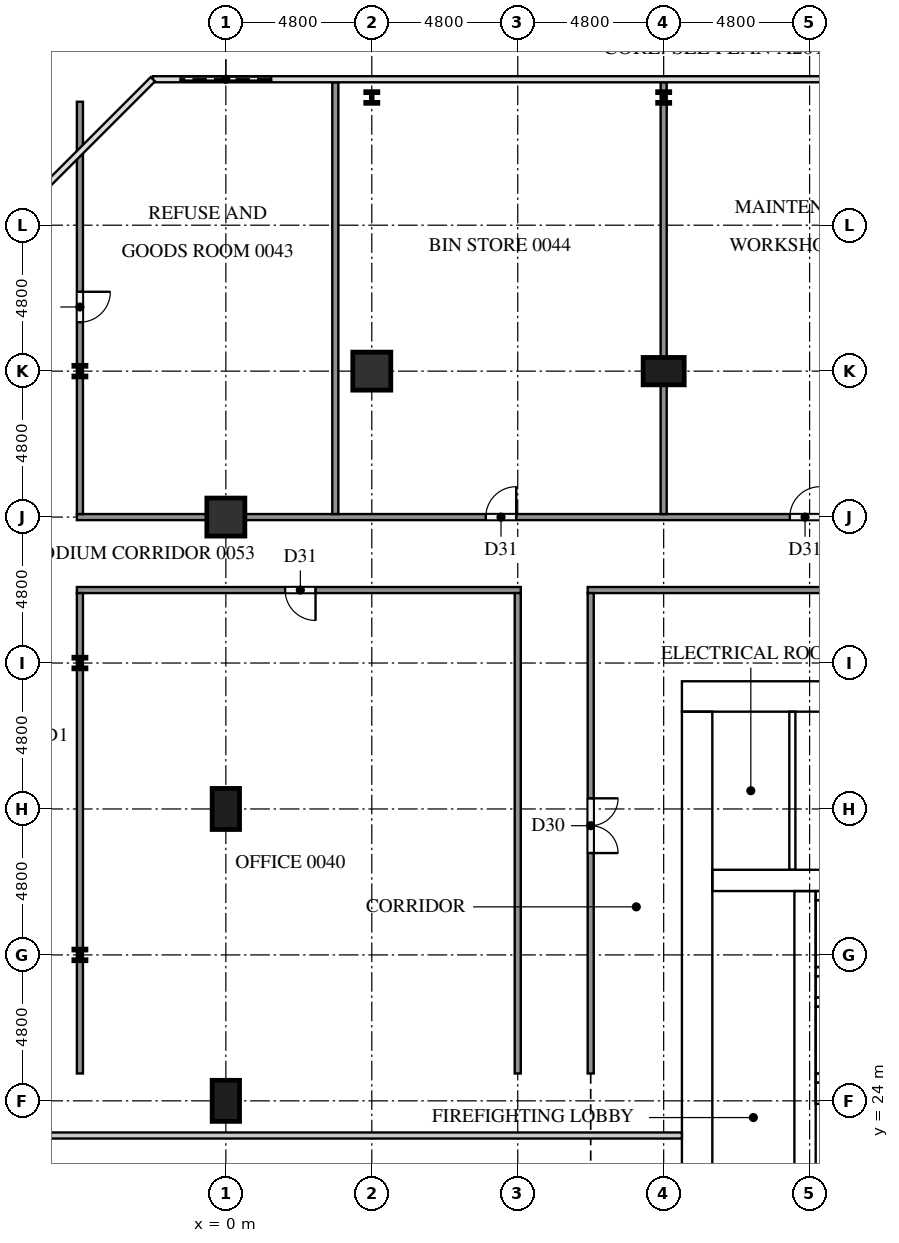
"""IFC4 building model, lengths in metres.
Left out: names, types, materials, properties, quantities, classifications, styles, units other than length and angle.
Written with IfcOpenShell. Run it as: python <this file> out.ifc"""

import sys

from ifc_helpers import new_model, si_unit, direction, frame, frame_2d, origin, origin_2d, place, context, subcontext, project, spatial, rectangle, i_section, extrude, element, fill, save


model = new_model("IFC4")
c1 = context("Model", 3, precision=1e-05, world=origin(), true_north=direction((0.0, 1.0)))
c2 = subcontext(c1, "Body", "Model", "MODEL_VIEW")
j1 = project(units=[si_unit("LENGTHUNIT", "METRE"), si_unit("PLANEANGLEUNIT", "RADIAN")], contexts=[c1])
p1 = place(None, origin())
s1 = spatial("IfcSite", under=j1, at=p1, CompositionType="ELEMENT")
p2 = place(p1, origin())
s2 = spatial("IfcBuilding", under=s1, at=p2, CompositionType="ELEMENT")
p3 = place(p2, origin())
s3 = spatial("IfcBuildingStorey", under=s2, at=p3, CompositionType="ELEMENT", Elevation=0.0)
p4 = place(p3, frame((15.0, 37.3, 0.0), z_axis=(0.0, 0.0, 1.0), x_axis=(1.0, 0.0, 0.0)))
e1 = element("IfcWall", 1, at=p4, inside=s3, PredefinedType="SHEAR", context=c2, shape_type="SweptSolid", body=[
    extrude(rectangle(XDim=32.4, YDim=1.0, at=frame_2d((16.2, 0.0))), origin(), (0.0, 0.0, 1.0), 5.7),
])
p5 = place(p4, frame((15.3, 0.0, 0.0)))
e2 = element("IfcOpeningElement", 2, at=p5, cuts=e1, PredefinedType="OPENING", context=c2, shape_type="SweptSolid", body=[
    extrude(rectangle(XDim=1.8, YDim=2.1, at=frame_2d((0.9, 1.05))), frame((0.0, 0.51, 0.0), z_axis=(0.0, -1.0, 0.0), x_axis=(1.0, 0.0, 0.0)), (0.0, 0.0, 1.0), 1.02),
])
p6 = place(p4, frame((1.766, 0.0, 0.0)))
e3 = element("IfcOpeningElement", 3, at=p6, cuts=e1, PredefinedType="OPENING", context=c2, shape_type="SweptSolid", body=[
    extrude(rectangle(XDim=1.0, YDim=2.1, at=frame_2d((0.5, 1.05))), frame((0.0, 0.51, 0.0), z_axis=(0.0, -1.0, 0.0), x_axis=(1.0, 0.0, 0.0)), (0.0, 0.0, 1.0), 1.02),
])
p7 = place(p4, frame((5.241, 0.0, 0.0)))
e4 = element("IfcOpeningElement", 4, at=p7, cuts=e1, PredefinedType="OPENING", context=c2, shape_type="SweptSolid", body=[
    extrude(rectangle(XDim=1.0, YDim=2.1, at=frame_2d((0.5, 1.05))), frame((0.0, 0.51, 0.0), z_axis=(0.0, -1.0, 0.0), x_axis=(1.0, 0.0, 0.0)), (0.0, 0.0, 1.0), 1.02),
])
p8 = place(p3, frame((15.5, 16.0, 0.0), z_axis=(0.0, 0.0, 1.0), x_axis=(0.0, 1.0, 0.0)))
e5 = element("IfcWall", 5, at=p8, inside=s3, PredefinedType="SHEAR", context=c2, shape_type="SweptSolid", body=[
    extrude(rectangle(XDim=20.8, YDim=1.0, at=frame_2d((10.4, 0.0))), origin(), (0.0, 0.0, 1.0), 5.7),
])
p9 = place(p8, frame((4.76, 0.0, 0.0)))
e6 = element("IfcOpeningElement", 6, at=p9, cuts=e5, PredefinedType="OPENING", context=c2, shape_type="SweptSolid", body=[
    extrude(rectangle(XDim=1.2, YDim=2.1, at=frame_2d((0.6, 1.05))), frame((0.0, 0.51, 0.0), z_axis=(0.0, -1.0, 0.0), x_axis=(1.0, 0.0, 0.0)), (0.0, 0.0, 1.0), 1.02),
])
p10 = place(p3, frame((19.05, 16.0, 0.0), z_axis=(0.0, 0.0, 1.0), x_axis=(0.0, 1.0, 0.0)))
e7 = element("IfcWall", 7, at=p10, inside=s3, PredefinedType="SHEAR", context=c2, shape_type="SweptSolid", body=[
    extrude(rectangle(XDim=14.9, YDim=0.7, at=frame_2d((7.45, 0.0))), origin(), (0.0, 0.0, 1.0), 5.7),
])
p11 = place(p10, frame((9.45, 0.0, 0.0)))
e8 = element("IfcOpeningElement", 8, at=p11, cuts=e7, PredefinedType="OPENING", context=c2, shape_type="SweptSolid", body=[
    extrude(rectangle(XDim=1.1, YDim=2.1, at=frame_2d((0.55, 1.05))), frame((0.0, 0.36, 0.0), z_axis=(0.0, -1.0, 0.0), x_axis=(1.0, 0.0, 0.0)), (0.0, 0.0, 1.0), 0.72),
])
p12 = place(p10, frame((12.95, 0.0, 0.0)))
e9 = element("IfcOpeningElement", 9, at=p12, cuts=e7, PredefinedType="OPENING", context=c2, shape_type="SweptSolid", body=[
    extrude(rectangle(XDim=1.1, YDim=2.1, at=frame_2d((0.55, 1.05))), frame((0.0, 0.36, 0.0), z_axis=(0.0, -1.0, 0.0), x_axis=(1.0, 0.0, 0.0)), (0.0, 0.0, 1.0), 0.72),
])
p13 = place(p10, frame((0.2, 0.0, 0.0)))
e10 = element("IfcOpeningElement", 10, at=p13, cuts=e7, PredefinedType="OPENING", context=c2, shape_type="SweptSolid", body=[
    extrude(rectangle(XDim=1.2, YDim=2.1, at=frame_2d((0.6, 1.05))), frame((0.0, 0.36, 0.0), z_axis=(0.0, -1.0, 0.0), x_axis=(1.0, 0.0, 0.0)), (0.0, 0.0, 1.0), 0.72),
])
for number, where, z_axis, x_axis in (
    (11, (19.4, 24.25, 0.0), (0.0, 0.0, 1.0), (1.0, 0.0, 0.0)),
    (12, (19.4, 27.75, 0.0), (0.0, 0.0, 1.0), (1.0, 0.0, 0.0)),
):
    element("IfcWall", number, at=place(p3, frame(where, z_axis=z_axis, x_axis=x_axis)), inside=s3, PredefinedType="SHEAR", context=c2, shape_type="SweptSolid", body=[
        extrude(rectangle(XDim=3.35, YDim=0.7, at=frame_2d((1.675, 0.0))), origin(), (0.0, 0.0, 1.0), 5.7),
    ])
p14 = place(p3, frame((16.0, 31.25, 0.0), z_axis=(0.0, 0.0, 1.0), x_axis=(1.0, 0.0, 0.0)))
e13 = element("IfcWall", 13, at=p14, inside=s3, PredefinedType="SHEAR", context=c2, shape_type="SweptSolid", body=[
    extrude(rectangle(XDim=6.75, YDim=0.7, at=frame_2d((3.375, 0.0))), origin(), (0.0, 0.0, 1.0), 5.7),
])
for number, where, z_axis, x_axis in (
    (14, (19.4, 24.75, -1.8), (0.0, 0.0, 1.0), (1.0, 0.0, 0.0)),
    (15, (19.4, 27.25, -1.8), (0.0, 0.0, 1.0), (1.0, 0.0, 0.0)),
):
    element("IfcWall", number, at=place(p3, frame(where, z_axis=z_axis, x_axis=x_axis)), inside=s3, PredefinedType="SOLIDWALL", context=c2, shape_type="SweptSolid", body=[
        extrude(rectangle(XDim=3.35, YDim=0.3, at=frame_2d((1.675, 0.0))), origin(), (0.0, 0.0, 1.0), 1.8),
    ])
p15 = place(p3, frame((19.55, 24.9, -1.8), z_axis=(0.0, 0.0, 1.0), x_axis=(0.0, 1.0, 0.0)))
e16 = element("IfcWall", 16, at=p15, inside=s3, PredefinedType="SOLIDWALL", context=c2, shape_type="SweptSolid", body=[
    extrude(rectangle(XDim=2.2, YDim=0.3, at=frame_2d((1.1, 0.0))), origin(), (0.0, 0.0, 1.0), 1.8),
])
for number, where, z_axis, x_axis in (
    (17, (19.4, 28.25, -1.8), (0.0, 0.0, 1.0), (1.0, 0.0, 0.0)),
    (18, (19.4, 30.75, -1.8), (0.0, 0.0, 1.0), (1.0, 0.0, 0.0)),
):
    element("IfcWall", number, at=place(p3, frame(where, z_axis=z_axis, x_axis=x_axis)), inside=s3, PredefinedType="SOLIDWALL", context=c2, shape_type="SweptSolid", body=[
        extrude(rectangle(XDim=3.35, YDim=0.3, at=frame_2d((1.675, 0.0))), origin(), (0.0, 0.0, 1.0), 1.8),
    ])
p16 = place(p3, frame((19.55, 28.4, -1.8), z_axis=(0.0, 0.0, 1.0), x_axis=(0.0, 1.0, 0.0)))
e19 = element("IfcWall", 19, at=p16, inside=s3, PredefinedType="SOLIDWALL", context=c2, shape_type="SweptSolid", body=[
    extrude(rectangle(XDim=2.2, YDim=0.3, at=frame_2d((1.1, 0.0))), origin(), (0.0, 0.0, 1.0), 1.8),
])
p17 = place(p3, frame((14.4, 48.0, 0.0), z_axis=(0.0, 0.0, 1.0), x_axis=(1.0, 0.0, 0.0)))
e20 = element("IfcColumn", 20, at=p17, inside=s3, PredefinedType="COLUMN", context=c2, shape_type="SweptSolid", body=[
    extrude(rectangle(XDim=1.35, YDim=0.9, at=origin_2d()), origin(), (0.0, 0.0, 1.0), 5.7),
])
for number, where, z_axis, x_axis in (
    (21, (4.8, 48.0, 0.0), (0.0, 0.0, 1.0), (1.0, 0.0, 0.0)),
    (22, (0.0, 43.2, 0.0), (0.0, 0.0, 1.0), (1.0, 0.0, 0.0)),
):
    element("IfcColumn", number, at=place(p3, frame(where, z_axis=z_axis, x_axis=x_axis)), inside=s3, PredefinedType="COLUMN", context=c2, shape_type="SweptSolid", body=[
        extrude(rectangle(XDim=1.25, YDim=1.25, at=origin_2d()), origin(), (0.0, 0.0, 1.0), 5.7),
    ])
for number, where, z_axis, x_axis in (
    (23, (0.0, 33.6, 0.0), (0.0, 0.0, 1.0), (0.0, 1.0, 0.0)),
    (24, (0.0, 24.0, 0.0), (0.0, 0.0, 1.0), (0.0, 1.0, 0.0)),
):
    element("IfcColumn", number, at=place(p3, frame(where, z_axis=z_axis, x_axis=x_axis)), inside=s3, PredefinedType="COLUMN", context=c2, shape_type="SweptSolid", body=[
        extrude(rectangle(XDim=1.35, YDim=0.9, at=origin_2d()), origin(), (0.0, 0.0, 1.0), 5.7),
    ])
for number, where, z_axis, x_axis in (
    (25, (-4.8, 28.8, 0.0), (0.0, 0.0, 1.0), (1.0, 0.0, 0.0)),
    (26, (-4.8, 38.4, 0.0), (0.0, 0.0, 1.0), (1.0, 0.0, 0.0)),
    (27, (-4.8, 48.0, 0.0), (0.0, 0.0, 1.0), (1.0, 0.0, 0.0)),
    (28, (4.8, 57.0, 0.0), (0.0, 0.0, 1.0), (1.0, 0.0, 0.0)),
    (29, (14.4, 57.0, 0.0), (0.0, 0.0, 1.0), (1.0, 0.0, 0.0)),
):
    element("IfcColumn", number, at=place(p3, frame(where, z_axis=z_axis, x_axis=x_axis)), inside=s3, PredefinedType="COLUMN", context=c2, shape_type="SweptSolid", body=[
        extrude(i_section(OverallWidth=0.396, OverallDepth=0.381, WebThickness=0.019, FlangeThickness=0.03, at=origin_2d()), origin(), (0.0, 0.0, 1.0), 5.7),
    ])
p18 = place(p3, frame((2.4, 57.6, 0.0), z_axis=(0.0, 0.0, 1.0), x_axis=(-1.0, 0.0, 0.0)))
e30 = element("IfcWall", 30, at=p18, inside=s3, PredefinedType="SOLIDWALL", context=c2, shape_type="SweptSolid", body=[
    extrude(rectangle(XDim=4.8, YDim=0.15, at=frame_2d((2.4, 0.0))), origin(), (0.0, 0.0, 1.0), 5.7),
])
p19 = place(p18, frame((0.9, 0.0, 0.0)))
e31 = element("IfcOpeningElement", 31, at=p19, cuts=e30, PredefinedType="OPENING", context=c2, shape_type="SweptSolid", body=[
    extrude(rectangle(XDim=3.0, YDim=3.6, at=frame_2d((1.5, 1.8))), frame((0.0, 0.085, 0.0), z_axis=(0.0, -1.0, 0.0), x_axis=(1.0, 0.0, 0.0)), (0.0, 0.0, 1.0), 0.17),
])
p20 = place(p3, frame((18.633, 31.6, 0.0), z_axis=(0.0, 0.0, 1.0), x_axis=(0.0, 1.0, 0.0)))
e32 = element("IfcWall", 32, at=p20, inside=s3, PredefinedType="PARTITIONING", context=c2, shape_type="SweptSolid", body=[
    extrude(rectangle(XDim=5.2, YDim=0.2, at=frame_2d((2.6, 0.0))), origin(), (0.0, 0.0, 1.0), 5.7),
])
p21 = place(p3, frame((-6.9, 22.86, 0.0), z_axis=(0.0, 0.0, 1.0), x_axis=(1.0, 0.0, 0.0)))
e33 = element("IfcWall", 33, at=p21, inside=s3, PredefinedType="PARTITIONING", context=c2, shape_type="SweptSolid", body=[
    extrude(rectangle(XDim=21.9, YDim=0.2, at=frame_2d((10.95, 0.0))), origin(), (0.0, 0.0, 1.0), 5.7),
])
p22 = place(p3, frame((9.7, 40.8, 0.0), z_axis=(0.0, 0.0, 1.0), x_axis=(-1.0, 0.0, 0.0)))
e34 = element("IfcWall", 34, at=p22, inside=s3, PredefinedType="PARTITIONING", context=c2, shape_type="SweptSolid", body=[
    extrude(rectangle(XDim=14.6, YDim=0.2, at=frame_2d((7.3, 0.0))), origin(), (0.0, 0.0, 1.0), 5.7),
])
p23 = place(p22, frame((6.75, 0.0, 0.0)))
e35 = element("IfcOpeningElement", 35, at=p23, cuts=e34, PredefinedType="OPENING", context=c2, shape_type="SweptSolid", body=[
    extrude(rectangle(XDim=1.0, YDim=2.1, at=frame_2d((0.5, 1.05))), frame((0.0, 0.11, 0.0), z_axis=(0.0, -1.0, 0.0), x_axis=(1.0, 0.0, 0.0)), (0.0, 0.0, 1.0), 0.22),
])
p24 = place(p3, frame((50.5, 40.8, 0.0), z_axis=(0.0, 0.0, 1.0), x_axis=(-1.0, 0.0, 0.0)))
e36 = element("IfcWall", 36, at=p24, inside=s3, PredefinedType="PARTITIONING", context=c2, shape_type="SweptSolid", body=[
    extrude(rectangle(XDim=38.6, YDim=0.2, at=frame_2d((19.3, 0.0))), origin(), (0.0, 0.0, 1.0), 5.7),
])
p25 = place(p24, frame((19.35, 0.0, 0.0)))
e37 = element("IfcOpeningElement", 37, at=p25, cuts=e36, PredefinedType="OPENING", context=c2, shape_type="SweptSolid", body=[
    extrude(rectangle(XDim=1.8, YDim=2.1, at=frame_2d((0.9, 1.05))), frame((0.0, 0.11, 0.0), z_axis=(0.0, -1.0, 0.0), x_axis=(1.0, 0.0, 0.0)), (0.0, 0.0, 1.0), 0.22),
])
p26 = place(p24, frame((17.05, 0.0, 0.0)))
e38 = element("IfcOpeningElement", 38, at=p26, cuts=e36, PredefinedType="OPENING", context=c2, shape_type="SweptSolid", body=[
    extrude(rectangle(XDim=1.8, YDim=2.1, at=frame_2d((0.9, 1.05))), frame((0.0, 0.11, 0.0), z_axis=(0.0, -1.0, 0.0), x_axis=(1.0, 0.0, 0.0)), (0.0, 0.0, 1.0), 0.22),
])
p27 = place(p3, frame((-4.9, 43.2, 0.0), z_axis=(0.0, 0.0, 1.0), x_axis=(1.0, 0.0, 0.0)))
e39 = element("IfcWall", 39, at=p27, inside=s3, PredefinedType="PARTITIONING", context=c2, shape_type="SweptSolid", body=[
    extrude(rectangle(XDim=48.1, YDim=0.2, at=frame_2d((24.05, 0.0))), origin(), (0.0, 0.0, 1.0), 5.7),
])
p28 = place(p27, frame((13.45, 0.0, 0.0)))
e40 = element("IfcOpeningElement", 40, at=p28, cuts=e39, PredefinedType="OPENING", context=c2, shape_type="SweptSolid", body=[
    extrude(rectangle(XDim=1.0, YDim=2.1, at=frame_2d((0.5, 1.05))), frame((0.0, 0.11, 0.0), z_axis=(0.0, -1.0, 0.0), x_axis=(1.0, 0.0, 0.0)), (0.0, 0.0, 1.0), 0.22),
])
p29 = place(p27, frame((23.45, 0.0, 0.0)))
e41 = element("IfcOpeningElement", 41, at=p29, cuts=e39, PredefinedType="OPENING", context=c2, shape_type="SweptSolid", body=[
    extrude(rectangle(XDim=1.0, YDim=2.1, at=frame_2d((0.5, 1.05))), frame((0.0, 0.11, 0.0), z_axis=(0.0, -1.0, 0.0), x_axis=(1.0, 0.0, 0.0)), (0.0, 0.0, 1.0), 0.22),
])
p30 = place(p27, frame((33.05, 0.0, 0.0)))
e42 = element("IfcOpeningElement", 42, at=p30, cuts=e39, PredefinedType="OPENING", context=c2, shape_type="SweptSolid", body=[
    extrude(rectangle(XDim=1.0, YDim=2.1, at=frame_2d((0.5, 1.05))), frame((0.0, 0.11, 0.0), z_axis=(0.0, -1.0, 0.0), x_axis=(1.0, 0.0, 0.0)), (0.0, 0.0, 1.0), 0.22),
])
p31 = place(p27, frame((42.85, 0.0, 0.0)))
e43 = element("IfcOpeningElement", 43, at=p31, cuts=e39, PredefinedType="OPENING", context=c2, shape_type="SweptSolid", body=[
    extrude(rectangle(XDim=1.0, YDim=2.1, at=frame_2d((0.5, 1.05))), frame((0.0, 0.11, 0.0), z_axis=(0.0, -1.0, 0.0), x_axis=(1.0, 0.0, 0.0)), (0.0, 0.0, 1.0), 0.22),
])
p32 = place(p3, frame((-4.8, 24.9, 0.0), z_axis=(0.0, 0.0, 1.0), x_axis=(0.0, 1.0, 0.0)))
e44 = element("IfcWall", 44, at=p32, inside=s3, PredefinedType="PARTITIONING", context=c2, shape_type="SweptSolid", body=[
    extrude(rectangle(XDim=15.8, YDim=0.2, at=frame_2d((7.9, 0.0))), origin(), (0.0, 0.0, 1.0), 5.7),
])
p33 = place(p3, frame((-4.8, 56.86, 0.0), z_axis=(0.0, 0.0, 1.0), x_axis=(0.0, -1.0, 0.0)))
e45 = element("IfcWall", 45, at=p33, inside=s3, PredefinedType="PARTITIONING", context=c2, shape_type="SweptSolid", body=[
    extrude(rectangle(XDim=13.56, YDim=0.2, at=frame_2d((6.78, 0.0))), origin(), (0.0, 0.0, 1.0), 5.7),
])
p34 = place(p33, frame((6.25, 0.0, 0.0)))
e46 = element("IfcOpeningElement", 46, at=p34, cuts=e45, PredefinedType="OPENING", context=c2, shape_type="SweptSolid", body=[
    extrude(rectangle(XDim=1.0, YDim=2.1, at=frame_2d((0.5, 1.05))), frame((0.0, 0.11, 0.0), z_axis=(0.0, -1.0, 0.0), x_axis=(1.0, 0.0, 0.0)), (0.0, 0.0, 1.0), 0.22),
])
p35 = place(p3, frame((3.6, 43.3, 0.0), z_axis=(0.0, 0.0, 1.0), x_axis=(0.0, 1.0, 0.0)))
e47 = element("IfcWall", 47, at=p35, inside=s3, PredefinedType="PARTITIONING", context=c2, shape_type="SweptSolid", body=[
    extrude(rectangle(XDim=14.2, YDim=0.2, at=frame_2d((7.1, 0.0))), origin(), (0.0, 0.0, 1.0), 5.7),
])
p36 = place(p3, frame((9.6, 24.9, 0.0), z_axis=(0.0, 0.0, 1.0), x_axis=(0.0, 1.0, 0.0)))
e48 = element("IfcWall", 48, at=p36, inside=s3, PredefinedType="PARTITIONING", context=c2, shape_type="SweptSolid", body=[
    extrude(rectangle(XDim=15.8, YDim=0.2, at=frame_2d((7.9, 0.0))), origin(), (0.0, 0.0, 1.0), 5.7),
])
p37 = place(p3, frame((12.0, 40.7, 0.0), z_axis=(0.0, 0.0, 1.0), x_axis=(0.0, -1.0, 0.0)))
e49 = element("IfcWall", 49, at=p37, inside=s3, PredefinedType="PARTITIONING", context=c2, shape_type="SweptSolid", body=[
    extrude(rectangle(XDim=15.8, YDim=0.2, at=frame_2d((7.9, 0.0))), origin(), (0.0, 0.0, 1.0), 5.7),
])
p38 = place(p37, frame((6.75, 0.0, 0.0)))
e50 = element("IfcOpeningElement", 50, at=p38, cuts=e49, PredefinedType="OPENING", context=c2, shape_type="SweptSolid", body=[
    extrude(rectangle(XDim=1.8, YDim=2.1, at=frame_2d((0.9, 1.05))), frame((0.0, 0.11, 0.0), z_axis=(0.0, -1.0, 0.0), x_axis=(1.0, 0.0, 0.0)), (0.0, 0.0, 1.0), 0.22),
])
p39 = place(p3, frame((14.4, 43.3, 0.0), z_axis=(0.0, 0.0, 1.0), x_axis=(0.0, 1.0, 0.0)))
e51 = element("IfcWall", 51, at=p39, inside=s3, PredefinedType="PARTITIONING", context=c2, shape_type="SweptSolid", body=[
    extrude(rectangle(XDim=14.2, YDim=0.2, at=frame_2d((7.1, 0.0))), origin(), (0.0, 0.0, 1.0), 5.7),
])
p40 = place(p19, origin())
e52 = element("IfcDoor", 52, at=p40, inside=s3, OperationType="ROLLINGUP", PredefinedType="DOOR", context=c2, shape_type="SweptSolid", body=[
    extrude(rectangle(XDim=3.0, YDim=3.6, at=frame_2d((1.5, 1.8))), frame((0.0, 0.025, 0.0), z_axis=(0.0, -1.0, 0.0), x_axis=(1.0, 0.0, 0.0)), (0.0, 0.0, 1.0), 0.05),
])
fill(e31, e52)
p41 = place(p11, origin())
e53 = element("IfcDoor", 53, at=p41, inside=s3, OperationType="DOUBLE_DOOR_SLIDING", PredefinedType="DOOR", context=c2, shape_type="SweptSolid", body=[
    extrude(rectangle(XDim=1.1, YDim=2.1, at=frame_2d((0.55, 1.05))), frame((0.0, 0.025, 0.0), z_axis=(0.0, -1.0, 0.0), x_axis=(1.0, 0.0, 0.0)), (0.0, 0.0, 1.0), 0.05),
])
fill(e8, e53)
p42 = place(p12, origin())
e54 = element("IfcDoor", 54, at=p42, inside=s3, OperationType="DOUBLE_DOOR_SLIDING", PredefinedType="DOOR", context=c2, shape_type="SweptSolid", body=[
    extrude(rectangle(XDim=1.1, YDim=2.1, at=frame_2d((0.55, 1.05))), frame((0.0, 0.025, 0.0), z_axis=(0.0, -1.0, 0.0), x_axis=(1.0, 0.0, 0.0)), (0.0, 0.0, 1.0), 0.05),
])
fill(e9, e54)
p43 = place(p9, origin())
e55 = element("IfcDoor", 55, at=p43, inside=s3, OperationType="SINGLE_SWING_LEFT", PredefinedType="DOOR", context=c2, shape_type="SweptSolid", body=[
    extrude(rectangle(XDim=1.2, YDim=2.1, at=frame_2d((0.6, 1.05))), frame((0.0, 0.025, 0.0), z_axis=(0.0, -1.0, 0.0), x_axis=(1.0, 0.0, 0.0)), (0.0, 0.0, 1.0), 0.05),
])
fill(e6, e55)
p44 = place(p6, origin())
e56 = element("IfcDoor", 56, at=p44, inside=s3, OperationType="SINGLE_SWING_LEFT", PredefinedType="DOOR", context=c2, shape_type="SweptSolid", body=[
    extrude(rectangle(XDim=1.0, YDim=2.1, at=frame_2d((0.5, 1.05))), frame((0.0, 0.025, 0.0), z_axis=(0.0, -1.0, 0.0), x_axis=(1.0, 0.0, 0.0)), (0.0, 0.0, 1.0), 0.05),
])
fill(e3, e56)
p45 = place(p23, origin())
e57 = element("IfcDoor", 57, at=p45, inside=s3, OperationType="SINGLE_SWING_LEFT", PredefinedType="DOOR", context=c2, shape_type="SweptSolid", body=[
    extrude(rectangle(XDim=1.0, YDim=2.1, at=frame_2d((0.5, 1.05))), frame((0.0, 0.025, 0.0), z_axis=(0.0, -1.0, 0.0), x_axis=(1.0, 0.0, 0.0)), (0.0, 0.0, 1.0), 0.05),
])
fill(e35, e57)
p46 = place(p34, origin())
e58 = element("IfcDoor", 58, at=p46, inside=s3, OperationType="SINGLE_SWING_LEFT", PredefinedType="DOOR", context=c2, shape_type="SweptSolid", body=[
    extrude(rectangle(XDim=1.0, YDim=2.1, at=frame_2d((0.5, 1.05))), frame((0.0, 0.025, 0.0), z_axis=(0.0, -1.0, 0.0), x_axis=(1.0, 0.0, 0.0)), (0.0, 0.0, 1.0), 0.05),
])
fill(e46, e58)
p47 = place(p28, origin())
e59 = element("IfcDoor", 59, at=p47, inside=s3, OperationType="SINGLE_SWING_RIGHT", PredefinedType="DOOR", context=c2, shape_type="SweptSolid", body=[
    extrude(rectangle(XDim=1.0, YDim=2.1, at=frame_2d((0.5, 1.05))), frame((0.0, 0.025, 0.0), z_axis=(0.0, -1.0, 0.0), x_axis=(1.0, 0.0, 0.0)), (0.0, 0.0, 1.0), 0.05),
])
fill(e40, e59)
p48 = place(p29, origin())
e60 = element("IfcDoor", 60, at=p48, inside=s3, OperationType="SINGLE_SWING_RIGHT", PredefinedType="DOOR", context=c2, shape_type="SweptSolid", body=[
    extrude(rectangle(XDim=1.0, YDim=2.1, at=frame_2d((0.5, 1.05))), frame((0.0, 0.025, 0.0), z_axis=(0.0, -1.0, 0.0), x_axis=(1.0, 0.0, 0.0)), (0.0, 0.0, 1.0), 0.05),
])
fill(e41, e60)
p49 = place(p38, origin())
e61 = element("IfcDoor", 61, at=p49, inside=s3, OperationType="DOUBLE_DOOR_SINGLE_SWING", PredefinedType="DOOR", context=c2, shape_type="SweptSolid", body=[
    extrude(rectangle(XDim=1.8, YDim=2.1, at=frame_2d((0.9, 1.05))), frame((0.0, 0.025, 0.0), z_axis=(0.0, -1.0, 0.0), x_axis=(1.0, 0.0, 0.0)), (0.0, 0.0, 1.0), 0.05),
])
fill(e50, e61)
save(model, sys.argv[1])
